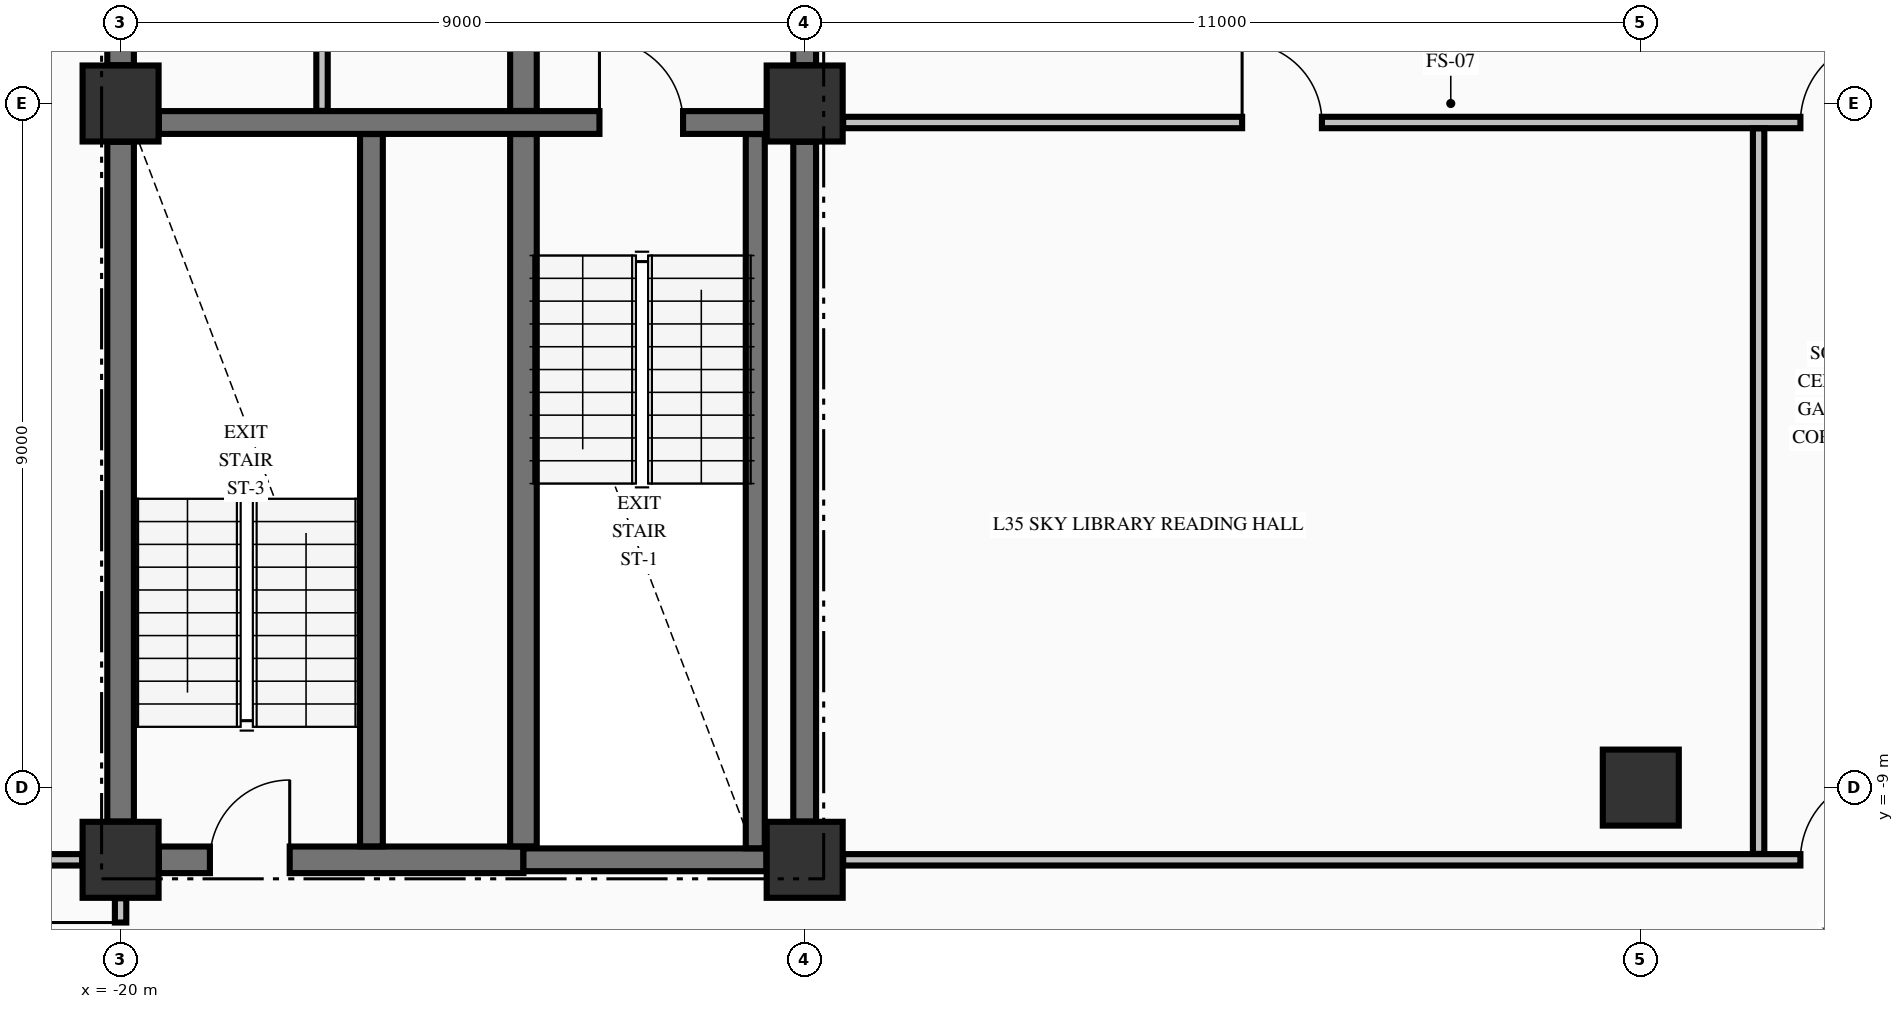
"""IFC4 building model, lengths in metres.
Left out: names, types, materials, properties, quantities, classifications, styles, units other than length and angle.
Written with IfcOpenShell. Run it as: python <this file> out.ifc"""

import sys

from ifc_helpers import new_model, si_unit, direction, frame, frame_2d, origin, origin_2d, place, context, subcontext, project, spatial, rectangle, extrude, element, fill, save


model = new_model("IFC4")
c1 = context("Model", 3, precision=1e-05, world=origin(), true_north=direction((0.0, 1.0)))
c2 = subcontext(c1, "Body", "Model", "MODEL_VIEW")
j1 = project(units=[si_unit("LENGTHUNIT", "METRE"), si_unit("PLANEANGLEUNIT", "RADIAN")], contexts=[c1])
p1 = place(None, origin())
s1 = spatial("IfcSite", under=j1, at=p1, CompositionType="ELEMENT")
p2 = place(p1, origin())
s2 = spatial("IfcBuilding", under=s1, at=p2, CompositionType="ELEMENT")
p3 = place(p2, frame((0.0, 0.0, 139.2)))
s3 = spatial("IfcBuildingStorey", under=s2, at=p3, CompositionType="ELEMENT", Elevation=139.2)
for number, where, z_axis, x_axis in (
    (1, (-20.0, -9.95, -0.25), (0.0, 0.0, 1.0), (1.0, 0.0, 0.0)),
    (2, (-11.0, -9.95, -0.25), (0.0, 0.0, 1.0), (1.0, 0.0, 0.0)),
    (3, (-11.0, 0.0, -0.25), (0.0, 0.0, 1.0), (1.0, 0.0, 0.0)),
    (4, (0.0, -9.0, -0.25), (0.0, 0.0, 1.0), (1.0, 0.0, 0.0)),
    (5, (-20.0, 0.0, -0.25), (0.0, 0.0, 1.0), (1.0, 0.0, 0.0)),
):
    element("IfcColumn", number, at=place(p3, frame(where, z_axis=z_axis, x_axis=x_axis)), inside=s3, PredefinedType="COLUMN", context=c2, shape_type="SweptSolid", body=[
        extrude(rectangle(XDim=1.0, YDim=1.0, at=origin_2d()), origin(), (0.0, 0.0, 1.0), 3.495),
    ])
p4 = place(p3, frame((-19.496, -9.95, 0.0), z_axis=(0.0, 0.0, 1.0), x_axis=(1.0, 0.0, 0.0)))
e6 = element("IfcWall", 6, at=p4, inside=s3, PredefinedType="SHEAR", context=c2, shape_type="SweptSolid", body=[
    extrude(rectangle(XDim=4.796, YDim=0.35, at=frame_2d((2.398, 0.0))), origin(), (0.0, 0.0, 1.0), 3.245),
])
p5 = place(p4, frame((0.671, 0.0, 0.0)))
e7 = element("IfcOpeningElement", 7, at=p5, cuts=e6, PredefinedType="OPENING", context=c2, shape_type="SweptSolid", body=[
    extrude(rectangle(XDim=1.05, YDim=2.15, at=frame_2d((0.525, 1.075))), frame((0.0, 0.185, 0.0), z_axis=(0.0, -1.0, 0.0), x_axis=(1.0, 0.0, 0.0)), (0.0, 0.0, 1.0), 0.37),
])
p6 = place(p3, frame((-14.7, -9.95, 0.0), z_axis=(0.0, 0.0, 1.0), x_axis=(1.0, 0.0, 0.0)))
e8 = element("IfcWall", 8, at=p6, inside=s3, PredefinedType="SHEAR", context=c2, shape_type="SweptSolid", body=[
    extrude(rectangle(XDim=3.196, YDim=0.3, at=frame_2d((1.598, 0.0))), origin(), (0.0, 0.0, 1.0), 3.245),
])
p7 = place(p3, frame((-19.496, -0.25, 0.0), z_axis=(0.0, 0.0, 1.0), x_axis=(1.0, 0.0, 0.0)))
e9 = element("IfcWall", 9, at=p7, inside=s3, PredefinedType="SHEAR", context=c2, shape_type="SweptSolid", body=[
    extrude(rectangle(XDim=7.992, YDim=0.3, at=frame_2d((3.996, 0.0))), origin(), (0.0, 0.0, 1.0), 3.245),
])
p8 = place(p7, frame((5.796, 0.0, 0.0)))
e10 = element("IfcOpeningElement", 10, at=p8, cuts=e9, PredefinedType="OPENING", context=c2, shape_type="SweptSolid", body=[
    extrude(rectangle(XDim=1.1, YDim=2.15, at=frame_2d((0.55, 1.075))), frame((0.0, 0.16, 0.0), z_axis=(0.0, -1.0, 0.0), x_axis=(1.0, 0.0, 0.0)), (0.0, 0.0, 1.0), 0.32),
])
p9 = place(p3, frame((-27.835, -9.95, 0.0), z_axis=(0.0, 0.0, 1.0), x_axis=(1.0, 0.0, 0.0)))
e11 = element("IfcWall", 11, at=p9, inside=s3, PredefinedType="PARTITIONING", context=c2, shape_type="SweptSolid", body=[
    extrude(rectangle(XDim=7.329, YDim=0.15, at=frame_2d((3.665, 0.0))), origin(), (0.0, 0.0, 1.0), 3.245),
])
p10 = place(p9, frame((3.335, 0.0, 0.0)))
e12 = element("IfcOpeningElement", 12, at=p10, cuts=e11, PredefinedType="OPENING", context=c2, shape_type="SweptSolid", body=[
    extrude(rectangle(XDim=1.0, YDim=2.15, at=frame_2d((0.5, 1.075))), frame((0.0, 0.085, 0.0), z_axis=(0.0, -1.0, 0.0), x_axis=(1.0, 0.0, 0.0)), (0.0, 0.0, 1.0), 0.17),
])
p11 = place(p3, frame((-10.494, -9.95, 0.0), z_axis=(0.0, 0.0, 1.0), x_axis=(1.0, 0.0, 0.0)))
e13 = element("IfcWall", 13, at=p11, inside=s3, PredefinedType="PARTITIONING", context=c2, shape_type="SweptSolid", body=[
    extrude(rectangle(XDim=20.988, YDim=0.15, at=frame_2d((10.494, 0.0))), origin(), (0.0, 0.0, 1.0), 3.245),
])
p12 = place(p11, frame((12.594, 0.0, 0.0)))
e14 = element("IfcOpeningElement", 14, at=p12, cuts=e13, PredefinedType="OPENING", context=c2, shape_type="SweptSolid", body=[
    extrude(rectangle(XDim=1.1, YDim=2.15, at=frame_2d((0.55, 1.075))), frame((0.0, 0.085, 0.0), z_axis=(0.0, -1.0, 0.0), x_axis=(1.0, 0.0, 0.0)), (0.0, 0.0, 1.0), 0.17),
])
p13 = place(p11, frame((18.799, 0.0, 0.0)))
e15 = element("IfcOpeningElement", 15, at=p13, cuts=e13, PredefinedType="OPENING", context=c2, shape_type="SweptSolid", body=[
    extrude(rectangle(XDim=0.95, YDim=2.15, at=frame_2d((0.475, 1.075))), frame((0.0, 0.085, 0.0), z_axis=(0.0, -1.0, 0.0), x_axis=(1.0, 0.0, 0.0)), (0.0, 0.0, 1.0), 0.17),
])
p14 = place(p3, frame((-10.494, -0.25, 0.0), z_axis=(0.0, 0.0, 1.0), x_axis=(1.0, 0.0, 0.0)))
e16 = element("IfcWall", 16, at=p14, inside=s3, PredefinedType="PARTITIONING", context=c2, shape_type="SweptSolid", body=[
    extrude(rectangle(XDim=20.988, YDim=0.15, at=frame_2d((10.494, 0.0))), origin(), (0.0, 0.0, 1.0), 3.245),
])
p15 = place(p14, frame((12.594, 0.0, 0.0)))
e17 = element("IfcOpeningElement", 17, at=p15, cuts=e16, PredefinedType="OPENING", context=c2, shape_type="SweptSolid", body=[
    extrude(rectangle(XDim=1.1, YDim=2.15, at=frame_2d((0.55, 1.075))), frame((0.0, 0.085, 0.0), z_axis=(0.0, -1.0, 0.0), x_axis=(1.0, 0.0, 0.0)), (0.0, 0.0, 1.0), 0.17),
])
p16 = place(p14, frame((5.249, 0.0, 0.0)))
e18 = element("IfcOpeningElement", 18, at=p16, cuts=e16, PredefinedType="OPENING", context=c2, shape_type="SweptSolid", body=[
    extrude(rectangle(XDim=1.05, YDim=2.15, at=frame_2d((0.525, 1.075))), frame((0.0, 0.085, 0.0), z_axis=(0.0, -1.0, 0.0), x_axis=(1.0, 0.0, 0.0)), (0.0, 0.0, 1.0), 0.17),
])
p17 = place(p14, frame((17.399, 0.0, 0.0)))
e19 = element("IfcOpeningElement", 19, at=p17, cuts=e16, PredefinedType="OPENING", context=c2, shape_type="SweptSolid", body=[
    extrude(rectangle(XDim=0.95, YDim=2.15, at=frame_2d((0.475, 1.075))), frame((0.0, 0.085, 0.0), z_axis=(0.0, -1.0, 0.0), x_axis=(1.0, 0.0, 0.0)), (0.0, 0.0, 1.0), 0.17),
])
p18 = place(p3, frame((-20.0, -9.446, 0.0), z_axis=(0.0, 0.0, 1.0), x_axis=(0.0, 1.0, 0.0)))
e20 = element("IfcWall", 20, at=p18, inside=s3, PredefinedType="SHEAR", context=c2, shape_type="SweptSolid", body=[
    extrude(rectangle(XDim=8.942, YDim=0.35, at=frame_2d((4.471, 0.0))), origin(), (0.0, 0.0, 1.0), 3.245),
])
p19 = place(p3, frame((-20.0, 0.504, 0.0), z_axis=(0.0, 0.0, 1.0), x_axis=(0.0, 1.0, 0.0)))
e21 = element("IfcWall", 21, at=p19, inside=s3, PredefinedType="SHEAR", context=c2, shape_type="SweptSolid", body=[
    extrude(rectangle(XDim=9.492, YDim=0.35, at=frame_2d((4.746, 0.0))), origin(), (0.0, 0.0, 1.0), 3.245),
])
p20 = place(p3, frame((-16.7, -9.773, 0.0), z_axis=(0.0, 0.0, 1.0), x_axis=(0.0, 1.0, 0.0)))
e22 = element("IfcWall", 22, at=p20, inside=s3, PredefinedType="SHEAR", context=c2, shape_type="SweptSolid", body=[
    extrude(rectangle(XDim=9.371, YDim=0.3, at=frame_2d((4.686, 0.0))), origin(), (0.0, 0.0, 1.0), 3.245),
])
p21 = place(p3, frame((-14.7, -9.773, 0.0), z_axis=(0.0, 0.0, 1.0), x_axis=(0.0, 1.0, 0.0)))
e23 = element("IfcWall", 23, at=p21, inside=s3, PredefinedType="SHEAR", context=c2, shape_type="SweptSolid", body=[
    extrude(rectangle(XDim=9.371, YDim=0.35, at=frame_2d((4.686, 0.0))), origin(), (0.0, 0.0, 1.0), 3.245),
])
p22 = place(p3, frame((-14.7, -0.098, 0.0), z_axis=(0.0, 0.0, 1.0), x_axis=(0.0, 1.0, 0.0)))
e24 = element("IfcWall", 24, at=p22, inside=s3, PredefinedType="SHEAR", context=c2, shape_type="SweptSolid", body=[
    extrude(rectangle(XDim=2.846, YDim=0.35, at=frame_2d((1.423, 0.0))), origin(), (0.0, 0.0, 1.0), 3.245),
])
p23 = place(p3, frame((-11.65, -9.798, 0.0), z_axis=(0.0, 0.0, 1.0), x_axis=(0.0, 1.0, 0.0)))
e25 = element("IfcWall", 25, at=p23, inside=s3, PredefinedType="SOLIDWALL", context=c2, shape_type="SweptSolid", body=[
    extrude(rectangle(XDim=9.396, YDim=0.25, at=frame_2d((4.698, 0.0))), origin(), (0.0, 0.0, 1.0), 3.245),
])
p24 = place(p3, frame((-11.0, -9.446, 0.0), z_axis=(0.0, 0.0, 1.0), x_axis=(0.0, 1.0, 0.0)))
e26 = element("IfcWall", 26, at=p24, inside=s3, PredefinedType="SHEAR", context=c2, shape_type="SweptSolid", body=[
    extrude(rectangle(XDim=8.942, YDim=0.3, at=frame_2d((4.471, 0.0))), origin(), (0.0, 0.0, 1.0), 3.245),
])
p25 = place(p3, frame((-11.0, 0.504, 0.0), z_axis=(0.0, 0.0, 1.0), x_axis=(0.0, 1.0, 0.0)))
e27 = element("IfcWall", 27, at=p25, inside=s3, PredefinedType="SHEAR", context=c2, shape_type="SweptSolid", body=[
    extrude(rectangle(XDim=2.244, YDim=0.3, at=frame_2d((1.122, 0.0))), origin(), (0.0, 0.0, 1.0), 3.245),
])
p26 = place(p25, frame((0.596, 0.0, 0.0)))
e28 = element("IfcOpeningElement", 28, at=p26, cuts=e27, PredefinedType="OPENING", context=c2, shape_type="SweptSolid", body=[
    extrude(rectangle(XDim=1.1, YDim=2.15, at=frame_2d((0.55, 1.075))), frame((0.0, 0.16, 0.0), z_axis=(0.0, -1.0, 0.0), x_axis=(1.0, 0.0, 0.0)), (0.0, 0.0, 1.0), 0.32),
])
p27 = place(p3, frame((-20.0, -12.472, 0.0), z_axis=(0.0, 0.0, 1.0), x_axis=(0.0, 1.0, 0.0)))
e29 = element("IfcWall", 29, at=p27, inside=s3, PredefinedType="PARTITIONING", context=c2, shape_type="SweptSolid", body=[
    extrude(rectangle(XDim=2.016, YDim=0.15, at=frame_2d((1.008, 0.0))), origin(), (0.0, 0.0, 1.0), 2.735),
])
p28 = place(p27, frame((0.747, 0.0, 0.0)))
e30 = element("IfcOpeningElement", 30, at=p28, cuts=e29, PredefinedType="OPENING", context=c2, shape_type="SweptSolid", body=[
    extrude(rectangle(XDim=0.95, YDim=2.15, at=frame_2d((0.475, 1.075))), frame((0.0, 0.085, 0.0), z_axis=(0.0, -1.0, 0.0), x_axis=(1.0, 0.0, 0.0)), (0.0, 0.0, 1.0), 0.17),
])
p29 = place(p3, frame((-17.35, -0.097, 0.0), z_axis=(0.0, 0.0, 1.0), x_axis=(0.0, 1.0, 0.0)))
e31 = element("IfcWall", 31, at=p29, inside=s3, PredefinedType="PARTITIONING", context=c2, shape_type="SweptSolid", body=[
    extrude(rectangle(XDim=10.419, YDim=0.15, at=frame_2d((5.209, 0.0))), origin(), (0.0, 0.0, 1.0), 3.245),
])
p30 = place(p3, frame((1.55, -9.872, 0.0), z_axis=(0.0, 0.0, 1.0), x_axis=(0.0, 1.0, 0.0)))
e32 = element("IfcWall", 32, at=p30, inside=s3, PredefinedType="PARTITIONING", context=c2, shape_type="SweptSolid", body=[
    extrude(rectangle(XDim=9.544, YDim=0.15, at=frame_2d((4.772, 0.0))), origin(), (0.0, 0.0, 1.0), 3.245),
])
p31 = place(p8, origin())
e33 = element("IfcDoor", 33, at=p31, inside=s3, OperationType="SINGLE_SWING_LEFT", PredefinedType="DOOR", context=c2, shape_type="SweptSolid", body=[
    extrude(rectangle(XDim=1.1, YDim=2.15, at=frame_2d((0.55, 1.075))), frame((0.0, 0.025, 0.0), z_axis=(0.0, -1.0, 0.0), x_axis=(1.0, 0.0, 0.0)), (0.0, 0.0, 1.0), 0.05),
])
fill(e10, e33)
p32 = place(p5, origin())
e34 = element("IfcDoor", 34, at=p32, inside=s3, OperationType="SINGLE_SWING_RIGHT", PredefinedType="DOOR", context=c2, shape_type="SweptSolid", body=[
    extrude(rectangle(XDim=1.05, YDim=2.15, at=frame_2d((0.525, 1.075))), frame((0.0, 0.025, 0.0), z_axis=(0.0, -1.0, 0.0), x_axis=(1.0, 0.0, 0.0)), (0.0, 0.0, 1.0), 0.05),
])
fill(e7, e34)
p33 = place(p12, origin())
e35 = element("IfcDoor", 35, at=p33, inside=s3, OperationType="SINGLE_SWING_RIGHT", PredefinedType="DOOR", context=c2, shape_type="SweptSolid", body=[
    extrude(rectangle(XDim=1.1, YDim=2.15, at=frame_2d((0.55, 1.075))), frame((0.0, 0.025, 0.0), z_axis=(0.0, -1.0, 0.0), x_axis=(1.0, 0.0, 0.0)), (0.0, 0.0, 1.0), 0.05),
])
fill(e14, e35)
p34 = place(p15, origin())
e36 = element("IfcDoor", 36, at=p34, inside=s3, OperationType="SINGLE_SWING_RIGHT", PredefinedType="DOOR", context=c2, shape_type="SweptSolid", body=[
    extrude(rectangle(XDim=1.1, YDim=2.15, at=frame_2d((0.55, 1.075))), frame((0.0, 0.025, 0.0), z_axis=(0.0, -1.0, 0.0), x_axis=(1.0, 0.0, 0.0)), (0.0, 0.0, 1.0), 0.05),
])
fill(e17, e36)
p35 = place(p16, origin())
e37 = element("IfcDoor", 37, at=p35, inside=s3, OperationType="SINGLE_SWING_LEFT", PredefinedType="DOOR", context=c2, shape_type="SweptSolid", body=[
    extrude(rectangle(XDim=1.05, YDim=2.15, at=frame_2d((0.525, 1.075))), frame((0.0, 0.025, 0.0), z_axis=(0.0, -1.0, 0.0), x_axis=(1.0, 0.0, 0.0)), (0.0, 0.0, 1.0), 0.05),
])
fill(e18, e37)
p36 = place(p28, origin())
e38 = element("IfcDoor", 38, at=p36, inside=s3, OperationType="SINGLE_SWING_RIGHT", PredefinedType="DOOR", context=c2, shape_type="SweptSolid", body=[
    extrude(rectangle(XDim=0.95, YDim=2.15, at=frame_2d((0.475, 1.075))), frame((0.0, 0.025, 0.0), z_axis=(0.0, -1.0, 0.0), x_axis=(1.0, 0.0, 0.0)), (0.0, 0.0, 1.0), 0.05),
])
fill(e30, e38)
save(model, sys.argv[1])
